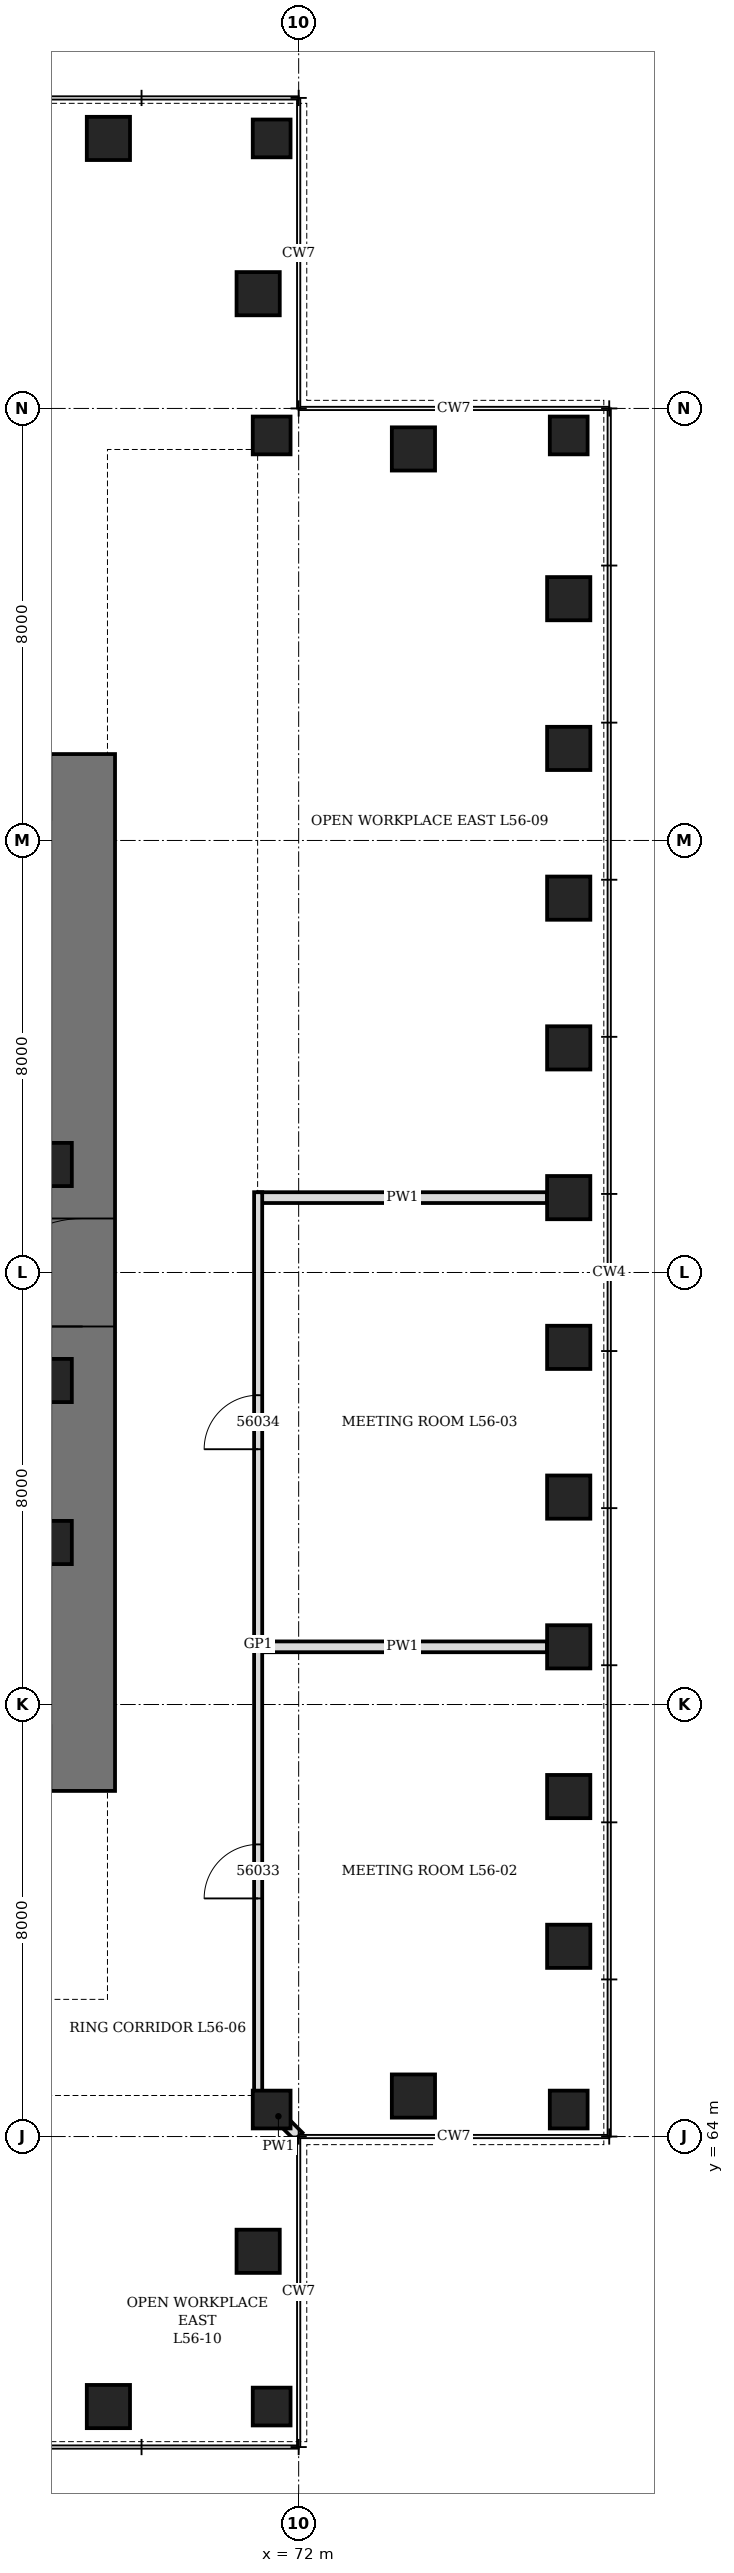
"""IFC4 building model, lengths in metres.
Left out: names, types, materials, properties, quantities, classifications, styles, units other than length and angle.
Written with IfcOpenShell. Run it as: python <this file> out.ifc"""

import sys

from ifc_helpers import new_model, si_unit, direction, frame, frame_2d, origin, origin_2d, place, context, subcontext, project, spatial, rectangle, hollow_rectangle, extrude, clip, halfspace, element, fill, save


model = new_model("IFC4")
c1 = context("Model", 3, precision=1e-05, world=origin(), true_north=direction((0.0, 1.0)))
c2 = subcontext(c1, "Body", "Model", "MODEL_VIEW")
j1 = project(units=[si_unit("LENGTHUNIT", "METRE"), si_unit("PLANEANGLEUNIT", "RADIAN")], contexts=[c1])
p1 = place(None, origin())
s1 = spatial("IfcSite", under=j1, at=p1, CompositionType="ELEMENT")
p2 = place(p1, origin())
s2 = spatial("IfcBuilding", under=s1, at=p2, CompositionType="ELEMENT")
p3 = place(p2, frame((0.0, 0.0, 250.3)))
s3 = spatial("IfcBuildingStorey", under=s2, at=p3, CompositionType="ELEMENT", Elevation=250.3)
p4 = place(p3, frame((68.477, 59.0, -0.16), z_axis=(0.0, 0.0, 1.0), x_axis=(1.0, 0.0, 0.0)))
e1 = element("IfcColumn", 1, at=p4, inside=s3, PredefinedType="COLUMN", context=c2, shape_type="SweptSolid", body=[
    extrude(hollow_rectangle(XDim=0.8, YDim=0.8, WallThickness=0.1, at=origin_2d()), origin(), (0.0, 0.0, 1.0), 4.36),
])
p5 = place(p3, frame((71.5, 59.0, -0.16), z_axis=(-0.057244014902, 0.0, 0.998360216935), x_axis=(0.0, -1.0, 0.0)))
e2 = element("IfcColumn", 2, at=p5, inside=s3, PredefinedType="COLUMN", context=c2, shape_type="Clipping", body=[
    clip(clip(extrude(hollow_rectangle(XDim=0.7, YDim=0.7, WallThickness=0.08, at=origin_2d()), origin(), (0.0, 0.0, 1.0), 4.367), halfspace(frame((0.0, 0.0, 0.022), z_axis=(0.0, 0.0, 1.0), x_axis=(1.0, 0.0, 0.0)), True)), halfspace(frame((0.0, 0.0, 4.345), z_axis=(0.0, 0.0, -1.0), x_axis=(1.0, 0.0, 0.0)), True)),
])
p6 = place(p3, frame((71.25, 61.875, -0.16), z_axis=(0.0, 0.0, 1.0), x_axis=(0.0, 1.0, 0.0)))
e3 = element("IfcColumn", 3, at=p6, inside=s3, PredefinedType="COLUMN", context=c2, shape_type="SweptSolid", body=[
    extrude(hollow_rectangle(XDim=0.8, YDim=0.8, WallThickness=0.1, at=origin_2d()), origin(), (0.0, 0.0, 1.0), 4.36),
])
p7 = place(p3, frame((71.5, 64.5, -0.16), z_axis=(-0.057150453976, 0.057150453976, 0.99672847417), x_axis=(-0.707106781187, -0.707106781187, 0.0)))
e4 = element("IfcColumn", 4, at=p7, inside=s3, PredefinedType="COLUMN", context=c2, shape_type="Clipping", body=[
    clip(clip(extrude(hollow_rectangle(XDim=0.7, YDim=0.7, WallThickness=0.08, at=origin_2d()), origin(), (0.0, 0.0, 1.0), 4.375), halfspace(frame((0.0, 0.0, 0.031), z_axis=(0.0, 0.0, 1.0), x_axis=(1.0, 0.0, 0.0)), True)), halfspace(frame((0.0, 0.0, 4.344), z_axis=(0.0, 0.0, -1.0), x_axis=(1.0, 0.0, 0.0)), True)),
])
p8 = place(p3, frame((74.125, 64.75, -0.16), z_axis=(0.0, 0.0, 1.0), x_axis=(1.0, 0.0, 0.0)))
e5 = element("IfcColumn", 5, at=p8, inside=s3, PredefinedType="COLUMN", context=c2, shape_type="SweptSolid", body=[
    extrude(hollow_rectangle(XDim=0.8, YDim=0.8, WallThickness=0.1, at=origin_2d()), origin(), (0.0, 0.0, 1.0), 4.36),
])
p9 = place(p3, frame((77.0, 64.5, -0.16), z_axis=(0.0, 0.057244014902, 0.998360216935), x_axis=(-1.0, 0.0, 0.0)))
e6 = element("IfcColumn", 6, at=p9, inside=s3, PredefinedType="COLUMN", context=c2, shape_type="Clipping", body=[
    clip(clip(extrude(hollow_rectangle(XDim=0.7, YDim=0.7, WallThickness=0.08, at=origin_2d()), origin(), (0.0, 0.0, 1.0), 4.367), halfspace(frame((0.0, 0.0, 0.022), z_axis=(0.0, 0.0, 1.0), x_axis=(1.0, 0.0, 0.0)), True)), halfspace(frame((0.0, 0.0, 4.345), z_axis=(0.0, 0.0, -1.0), x_axis=(1.0, 0.0, 0.0)), True)),
])
for number, where, z_axis, x_axis in (
    (7, (77.0, 67.523, -0.16), (0.0, 0.0, 1.0), (0.0, 1.0, 0.0)),
    (8, (77.0, 70.295, -0.16), (0.0, 0.0, 1.0), (0.0, 1.0, 0.0)),
    (9, (77.0, 73.068, -0.16), (0.0, 0.0, 1.0), (0.0, 1.0, 0.0)),
    (10, (77.0, 75.841, -0.16), (0.0, 0.0, 1.0), (0.0, 1.0, 0.0)),
    (11, (77.0, 78.614, -0.16), (0.0, 0.0, 1.0), (0.0, 1.0, 0.0)),
    (12, (77.0, 81.386, -0.16), (0.0, 0.0, 1.0), (0.0, 1.0, 0.0)),
    (13, (77.0, 84.159, -0.16), (0.0, 0.0, 1.0), (0.0, 1.0, 0.0)),
    (14, (77.0, 86.932, -0.16), (0.0, 0.0, 1.0), (0.0, 1.0, 0.0)),
    (15, (77.0, 89.705, -0.16), (0.0, 0.0, 1.0), (0.0, 1.0, 0.0)),
    (16, (77.0, 92.477, -0.16), (0.0, 0.0, 1.0), (0.0, 1.0, 0.0)),
):
    element("IfcColumn", number, at=place(p3, frame(where, z_axis=z_axis, x_axis=x_axis)), inside=s3, PredefinedType="COLUMN", context=c2, shape_type="SweptSolid", body=[
        extrude(hollow_rectangle(XDim=0.8, YDim=0.8, WallThickness=0.1, at=origin_2d()), origin(), (0.0, 0.0, 1.0), 4.36),
    ])
p10 = place(p3, frame((77.0, 95.5, -0.16), z_axis=(0.0, -0.057244014902, 0.998360216935), x_axis=(1.0, 0.0, 0.0)))
e17 = element("IfcColumn", 17, at=p10, inside=s3, PredefinedType="COLUMN", context=c2, shape_type="Clipping", body=[
    clip(clip(extrude(hollow_rectangle(XDim=0.7, YDim=0.7, WallThickness=0.08, at=origin_2d()), origin(), (0.0, 0.0, 1.0), 4.367), halfspace(frame((0.0, 0.0, 0.022), z_axis=(0.0, 0.0, 1.0), x_axis=(1.0, 0.0, 0.0)), True)), halfspace(frame((0.0, 0.0, 4.345), z_axis=(0.0, 0.0, -1.0), x_axis=(1.0, 0.0, 0.0)), True)),
])
p11 = place(p3, frame((74.125, 95.25, -0.16), z_axis=(0.0, 0.0, 1.0), x_axis=(1.0, 0.0, 0.0)))
e18 = element("IfcColumn", 18, at=p11, inside=s3, PredefinedType="COLUMN", context=c2, shape_type="SweptSolid", body=[
    extrude(hollow_rectangle(XDim=0.8, YDim=0.8, WallThickness=0.1, at=origin_2d()), origin(), (0.0, 0.0, 1.0), 4.36),
])
p12 = place(p3, frame((71.5, 95.5, -0.16), z_axis=(-0.057150453976, -0.057150453976, 0.99672847417), x_axis=(0.707106781187, -0.707106781187, 0.0)))
e19 = element("IfcColumn", 19, at=p12, inside=s3, PredefinedType="COLUMN", context=c2, shape_type="Clipping", body=[
    clip(clip(extrude(hollow_rectangle(XDim=0.7, YDim=0.7, WallThickness=0.08, at=origin_2d()), origin(), (0.0, 0.0, 1.0), 4.375), halfspace(frame((0.0, 0.0, 0.031), z_axis=(0.0, 0.0, 1.0), x_axis=(1.0, 0.0, 0.0)), True)), halfspace(frame((0.0, 0.0, 4.344), z_axis=(0.0, 0.0, -1.0), x_axis=(1.0, 0.0, 0.0)), True)),
])
p13 = place(p3, frame((71.25, 98.125, -0.16), z_axis=(0.0, 0.0, 1.0), x_axis=(0.0, 1.0, 0.0)))
e20 = element("IfcColumn", 20, at=p13, inside=s3, PredefinedType="COLUMN", context=c2, shape_type="SweptSolid", body=[
    extrude(hollow_rectangle(XDim=0.8, YDim=0.8, WallThickness=0.1, at=origin_2d()), origin(), (0.0, 0.0, 1.0), 4.36),
])
p14 = place(p3, frame((71.5, 101.0, -0.16), z_axis=(-0.057244014902, 0.0, 0.998360216935), x_axis=(0.0, -1.0, 0.0)))
e21 = element("IfcColumn", 21, at=p14, inside=s3, PredefinedType="COLUMN", context=c2, shape_type="Clipping", body=[
    clip(clip(extrude(hollow_rectangle(XDim=0.7, YDim=0.7, WallThickness=0.08, at=origin_2d()), origin(), (0.0, 0.0, 1.0), 4.367), halfspace(frame((0.0, 0.0, 0.022), z_axis=(0.0, 0.0, 1.0), x_axis=(1.0, 0.0, 0.0)), True)), halfspace(frame((0.0, 0.0, 4.345), z_axis=(0.0, 0.0, -1.0), x_axis=(1.0, 0.0, 0.0)), True)),
])
p15 = place(p3, frame((68.477, 101.0, -0.16), z_axis=(0.0, 0.0, 1.0), x_axis=(1.0, 0.0, 0.0)))
e22 = element("IfcColumn", 22, at=p15, inside=s3, PredefinedType="COLUMN", context=c2, shape_type="SweptSolid", body=[
    extrude(hollow_rectangle(XDim=0.8, YDim=0.8, WallThickness=0.1, at=origin_2d()), origin(), (0.0, 0.0, 1.0), 4.36),
])
p16 = place(p3, frame((68.0, 70.4, 0.0), z_axis=(0.0, 0.0, 1.0), x_axis=(0.0, 1.0, 0.0)))
e23 = element("IfcWall", 23, at=p16, inside=s3, PredefinedType="SHEAR", context=c2, shape_type="SweptSolid", body=[
    extrude(rectangle(XDim=19.2, YDim=1.2, at=frame_2d((9.6, 0.0))), origin(), (0.0, 0.0, 1.0), 4.2),
])
p17 = place(p16, frame((8.6, 0.0, 0.0)))
e24 = element("IfcOpeningElement", 24, at=p17, cuts=e23, PredefinedType="OPENING", context=c2, shape_type="SweptSolid", body=[
    extrude(rectangle(XDim=2.0, YDim=2.4, at=frame_2d((1.0, 1.2))), frame((0.0, 0.61, 0.0), z_axis=(0.0, -1.0, 0.0), x_axis=(1.0, 0.0, 0.0)), (0.0, 0.0, 1.0), 1.22),
])
for number, where, z_axis, x_axis in (
    (25, (67.4, 75.0, 0.0), (0.0, 0.0, 1.0), (1.0, 0.0, 0.0)),
    (26, (67.4, 78.0, 0.0), (0.0, 0.0, 1.0), (1.0, 0.0, 0.0)),
    (27, (67.4, 82.0, 0.0), (0.0, 0.0, 1.0), (1.0, 0.0, 0.0)),
):
    element("IfcColumn", number, at=place(p3, frame(where, z_axis=z_axis, x_axis=x_axis)), inside=s3, PredefinedType="COLUMN", context=c2, shape_type="SweptSolid", body=[
        extrude(hollow_rectangle(XDim=0.8, YDim=0.8, WallThickness=0.1, at=origin_2d()), origin(), (0.0, 0.0, 1.0), 4.2),
    ])
for number, where, z_axis, x_axis in (
    (28, (71.25, 73.068, 0.0), (0.0, 0.0, 1.0), (1.0, 0.0, 0.0)),
    (29, (71.25, 81.386, 0.0), (0.0, 0.0, 1.0), (1.0, 0.0, 0.0)),
):
    element("IfcWall", number, at=place(p3, frame(where, z_axis=z_axis, x_axis=x_axis)), inside=s3, PredefinedType="PARTITIONING", context=c2, shape_type="SweptSolid", body=[
        extrude(rectangle(XDim=5.35, YDim=0.2, at=frame_2d((2.675, 0.0))), origin(), (0.0, 0.0, 1.0), 3.428),
    ])
p18 = place(p3, frame((71.25, 64.75, 0.0), z_axis=(0.0, 0.0, 1.0), x_axis=(0.0, 1.0, 0.0)))
e30 = element("IfcWall", 30, at=p18, inside=s3, PredefinedType="PARTITIONING", context=c2, shape_type="SweptSolid", body=[
    extrude(rectangle(XDim=16.736, YDim=0.15, at=frame_2d((8.368, 0.0))), origin(), (0.0, 0.0, 1.0), 4.04),
])
p19 = place(p18, frame((3.659, 0.0, 0.0)))
e31 = element("IfcOpeningElement", 31, at=p19, cuts=e30, PredefinedType="OPENING", context=c2, shape_type="SweptSolid", body=[
    extrude(rectangle(XDim=1.0, YDim=2.4, at=frame_2d((0.5, 1.2))), frame((0.0, 0.085, 0.0), z_axis=(0.0, -1.0, 0.0), x_axis=(1.0, 0.0, 0.0)), (0.0, 0.0, 1.0), 0.17),
])
p20 = place(p18, frame((11.977, 0.0, 0.0)))
e32 = element("IfcOpeningElement", 32, at=p20, cuts=e30, PredefinedType="OPENING", context=c2, shape_type="SweptSolid", body=[
    extrude(rectangle(XDim=1.0, YDim=2.4, at=frame_2d((0.5, 1.2))), frame((0.0, 0.085, 0.0), z_axis=(0.0, -1.0, 0.0), x_axis=(1.0, 0.0, 0.0)), (0.0, 0.0, 1.0), 0.17),
])
p21 = place(p3, frame((71.25, 64.75, 0.0), z_axis=(0.0, 0.0, 1.0), x_axis=(0.707106781187, -0.707106781187, 0.0)))
e33 = element("IfcWall", 33, at=p21, inside=s3, PredefinedType="PARTITIONING", context=c2, shape_type="SweptSolid", body=[
    extrude(rectangle(XDim=1.061, YDim=0.2, at=frame_2d((0.53, 0.0))), origin(), (0.0, 0.0, 1.0), 4.04),
])
p22 = place(p17, origin())
e34 = element("IfcDoor", 34, at=p22, inside=s3, OperationType="DOUBLE_DOOR_SINGLE_SWING", PredefinedType="DOOR", context=c2, shape_type="SweptSolid", body=[
    extrude(rectangle(XDim=2.0, YDim=2.4, at=frame_2d((1.0, 1.2))), frame((0.0, 0.35, 0.0), z_axis=(0.0, -1.0, 0.0), x_axis=(1.0, 0.0, 0.0)), (0.0, 0.0, 1.0), 0.7),
])
fill(e24, e34)
p23 = place(p19, origin())
e35 = element("IfcDoor", 35, at=p23, inside=s3, OperationType="SINGLE_SWING_RIGHT", PredefinedType="DOOR", context=c2, shape_type="SweptSolid", body=[
    extrude(rectangle(XDim=1.0, YDim=2.4, at=frame_2d((0.5, 1.2))), frame((0.0, 0.075, 0.0), z_axis=(0.0, -1.0, 0.0), x_axis=(1.0, 0.0, 0.0)), (0.0, 0.0, 1.0), 0.149),
])
fill(e31, e35)
p24 = place(p20, origin())
e36 = element("IfcDoor", 36, at=p24, inside=s3, OperationType="SINGLE_SWING_RIGHT", PredefinedType="DOOR", context=c2, shape_type="SweptSolid", body=[
    extrude(rectangle(XDim=1.0, YDim=2.4, at=frame_2d((0.5, 1.2))), frame((0.0, 0.075, 0.0), z_axis=(0.0, -1.0, 0.0), x_axis=(1.0, 0.0, 0.0)), (0.0, 0.0, 1.0), 0.149),
])
fill(e32, e36)
save(model, sys.argv[1])
